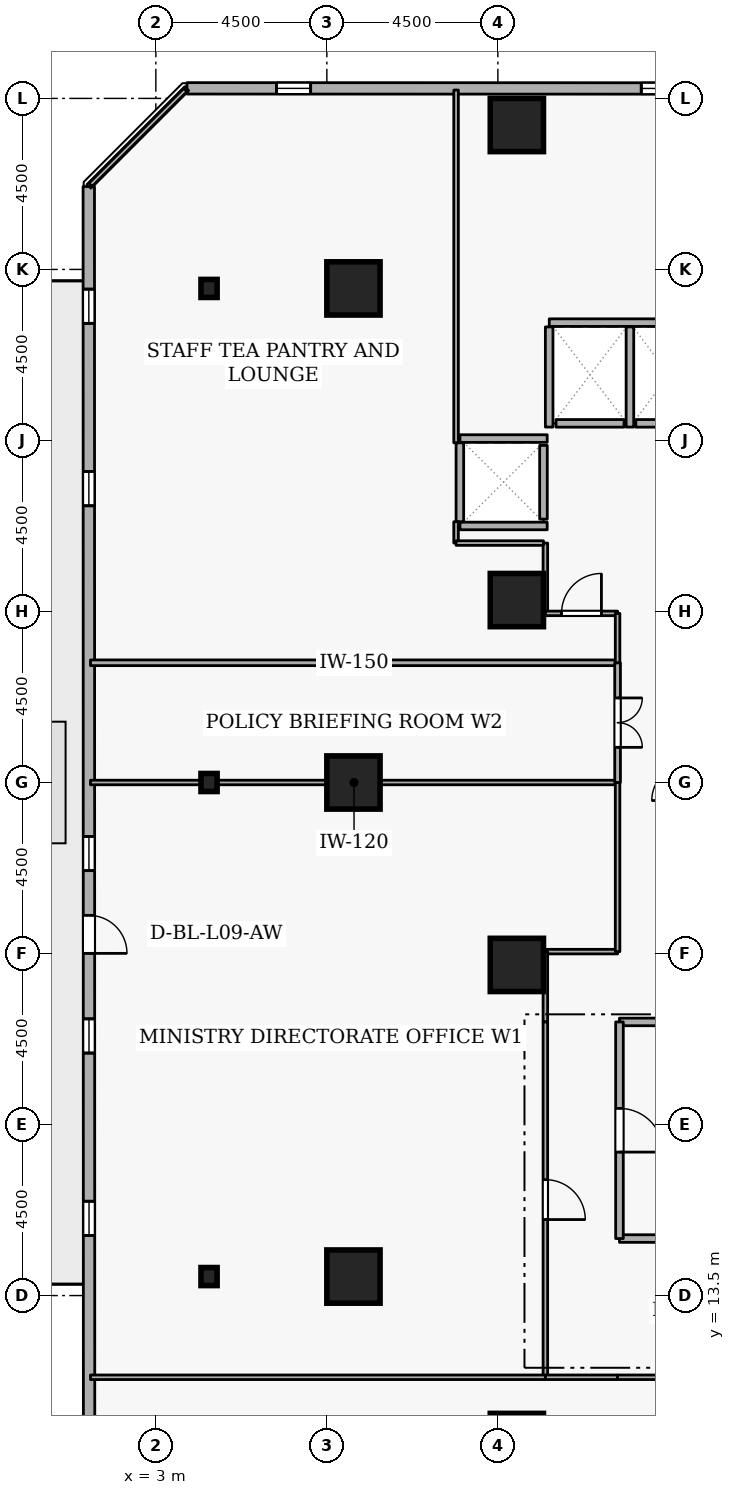
"""IFC4 building model, lengths in metres.
Left out: names, types, materials, properties, quantities, classifications, styles, units other than length and angle.
Written with IfcOpenShell. Run it as: python <this file> out.ifc"""

import sys

from ifc_helpers import new_model, si_unit, direction, frame, frame_2d, origin, origin_2d, place, context, subcontext, project, spatial, rectangle, i_section, extrude, element, fill, save


model = new_model("IFC4")
c1 = context("Model", 3, precision=1e-05, world=origin(), true_north=direction((0.0, 1.0)))
c2 = subcontext(c1, "Body", "Model", "MODEL_VIEW")
j1 = project(units=[si_unit("LENGTHUNIT", "METRE"), si_unit("PLANEANGLEUNIT", "RADIAN")], contexts=[c1])
p1 = place(None, origin())
s1 = spatial("IfcSite", under=j1, at=p1, CompositionType="ELEMENT")
p2 = place(p1, origin())
s2 = spatial("IfcBuilding", under=s1, at=p2, CompositionType="ELEMENT")
p3 = place(p2, frame((0.0, 0.0, 38.7)))
s3 = spatial("IfcBuildingStorey", under=s2, at=p3, CompositionType="ELEMENT", Elevation=38.7)
for number, where, z_axis, x_axis in (
    (1, (12.5, 9.7, 0.0), (0.0, 0.0, 1.0), (1.0, 0.0, 0.0)),
    (2, (12.5, 44.3, 0.0), (0.0, 0.0, 1.0), (1.0, 0.0, 0.0)),
    (3, (8.2, 14.0, 0.0), (0.0, 0.0, 1.0), (1.0, 0.0, 0.0)),
    (4, (8.2, 27.0, 0.0), (0.0, 0.0, 1.0), (1.0, 0.0, 0.0)),
    (5, (8.2, 40.0, 0.0), (0.0, 0.0, 1.0), (1.0, 0.0, 0.0)),
    (6, (12.5, 22.2, 0.0), (0.0, 0.0, 1.0), (1.0, 0.0, 0.0)),
    (7, (12.5, 31.8, 0.0), (0.0, 0.0, 1.0), (1.0, 0.0, 0.0)),
):
    element("IfcColumn", number, at=place(p3, frame(where, z_axis=z_axis, x_axis=x_axis)), inside=s3, PredefinedType="COLUMN", context=c2, shape_type="SweptSolid", body=[
        extrude(rectangle(XDim=1.4, YDim=1.4, at=origin_2d()), origin(), (0.0, 0.0, 1.0), 3.6),
    ])
for number, where, z_axis, x_axis in (
    (8, (4.4, 14.0, 0.0), (0.0, 0.0, 1.0), (1.0, 0.0, 0.0)),
    (9, (4.4, 27.0, 0.0), (0.0, 0.0, 1.0), (1.0, 0.0, 0.0)),
    (10, (4.4, 40.0, 0.0), (0.0, 0.0, 1.0), (1.0, 0.0, 0.0)),
):
    element("IfcColumn", number, at=place(p3, frame(where, z_axis=z_axis, x_axis=x_axis)), inside=s3, PredefinedType="COLUMN", context=c2, shape_type="SweptSolid", body=[
        extrude(i_section(OverallWidth=0.424, OverallDepth=0.475, WebThickness=0.048, FlangeThickness=0.077, FilletRadius=0.015, at=origin_2d()), origin(), (0.0, 0.0, 1.0), 3.6),
    ])
p4 = place(p3, frame((38.573, 45.256, 0.0), z_axis=(0.0, 0.0, 1.0), x_axis=(-0.999999969775, 0.000245864205, 0.0)))
e11 = element("IfcWall", 11, at=p4, inside=s3, PredefinedType="STANDARD", context=c2, shape_type="SweptSolid", body=[
    extrude(rectangle(XDim=34.755, YDim=0.3, at=frame_2d((17.377, 0.0))), origin(), (0.0, 0.0, 1.0), 2.7),
])
p5 = place(p4, frame((7.5, 0.0, 0.72)))
e12 = element("IfcOpeningElement", 12, at=p5, cuts=e11, PredefinedType="OPENING", context=c2, shape_type="SweptSolid", body=[
    extrude(rectangle(XDim=0.9, YDim=1.75, at=frame_2d((0.45, 0.875))), frame((0.0, 0.16, 0.0), z_axis=(0.0, -1.0, 0.0), x_axis=(1.0, 0.0, 0.0)), (0.0, 0.0, 1.0), 0.32),
])
p6 = place(p4, frame((17.1, 0.0, 0.72)))
e13 = element("IfcOpeningElement", 13, at=p6, cuts=e11, PredefinedType="OPENING", context=c2, shape_type="SweptSolid", body=[
    extrude(rectangle(XDim=0.9, YDim=1.75, at=frame_2d((0.45, 0.875))), frame((0.0, 0.16, 0.0), z_axis=(0.0, -1.0, 0.0), x_axis=(1.0, 0.0, 0.0)), (0.0, 0.0, 1.0), 0.32),
])
p7 = place(p4, frame((21.9, 0.0, 0.72)))
e14 = element("IfcOpeningElement", 14, at=p7, cuts=e11, PredefinedType="OPENING", context=c2, shape_type="SweptSolid", body=[
    extrude(rectangle(XDim=0.9, YDim=1.75, at=frame_2d((0.45, 0.875))), frame((0.0, 0.16, 0.0), z_axis=(0.0, -1.0, 0.0), x_axis=(1.0, 0.0, 0.0)), (0.0, 0.0, 1.0), 0.32),
])
p8 = place(p4, frame((31.5, 0.0, 0.72)))
e15 = element("IfcOpeningElement", 15, at=p8, cuts=e11, PredefinedType="OPENING", context=c2, shape_type="SweptSolid", body=[
    extrude(rectangle(XDim=0.9, YDim=1.75, at=frame_2d((0.45, 0.875))), frame((0.0, 0.16, 0.0), z_axis=(0.0, -1.0, 0.0), x_axis=(1.0, 0.0, 0.0)), (0.0, 0.0, 1.0), 0.32),
])
p9 = place(p3, frame((1.235, 42.681, 0.0), z_axis=(0.0, 0.0, 1.0), x_axis=(0.000245864205, -0.999999969775, 0.0)))
e16 = element("IfcWall", 16, at=p9, inside=s3, PredefinedType="STANDARD", context=c2, shape_type="SweptSolid", body=[
    extrude(rectangle(XDim=34.755, YDim=0.3, at=frame_2d((17.377, 0.0))), origin(), (0.0, 0.0, 1.0), 2.7),
])
p10 = place(p9, frame((19.177, 0.0, 0.0)))
e17 = element("IfcOpeningElement", 17, at=p10, cuts=e16, PredefinedType="OPENING", context=c2, shape_type="SweptSolid", body=[
    extrude(rectangle(XDim=1.0, YDim=2.08, at=frame_2d((0.5, 1.04))), frame((0.0, 0.16, 0.0), z_axis=(0.0, -1.0, 0.0), x_axis=(1.0, 0.0, 0.0)), (0.0, 0.0, 1.0), 0.32),
])
p11 = place(p9, frame((2.7, 0.0, 0.72)))
e18 = element("IfcOpeningElement", 18, at=p11, cuts=e16, PredefinedType="OPENING", context=c2, shape_type="SweptSolid", body=[
    extrude(rectangle(XDim=0.9, YDim=1.75, at=frame_2d((0.45, 0.875))), frame((0.0, 0.16, 0.0), z_axis=(0.0, -1.0, 0.0), x_axis=(1.0, 0.0, 0.0)), (0.0, 0.0, 1.0), 0.32),
])
p12 = place(p9, frame((7.5, 0.0, 0.72)))
e19 = element("IfcOpeningElement", 19, at=p12, cuts=e16, PredefinedType="OPENING", context=c2, shape_type="SweptSolid", body=[
    extrude(rectangle(XDim=0.9, YDim=1.75, at=frame_2d((0.45, 0.875))), frame((0.0, 0.16, 0.0), z_axis=(0.0, -1.0, 0.0), x_axis=(1.0, 0.0, 0.0)), (0.0, 0.0, 1.0), 0.32),
])
p13 = place(p9, frame((17.1, 0.0, 0.72)))
e20 = element("IfcOpeningElement", 20, at=p13, cuts=e16, PredefinedType="OPENING", context=c2, shape_type="SweptSolid", body=[
    extrude(rectangle(XDim=0.9, YDim=1.75, at=frame_2d((0.45, 0.875))), frame((0.0, 0.16, 0.0), z_axis=(0.0, -1.0, 0.0), x_axis=(1.0, 0.0, 0.0)), (0.0, 0.0, 1.0), 0.32),
])
p14 = place(p9, frame((21.9, 0.0, 0.72)))
e21 = element("IfcOpeningElement", 21, at=p14, cuts=e16, PredefinedType="OPENING", context=c2, shape_type="SweptSolid", body=[
    extrude(rectangle(XDim=0.9, YDim=1.75, at=frame_2d((0.45, 0.875))), frame((0.0, 0.16, 0.0), z_axis=(0.0, -1.0, 0.0), x_axis=(1.0, 0.0, 0.0)), (0.0, 0.0, 1.0), 0.32),
])
p15 = place(p9, frame((26.7, 0.0, 0.72)))
e22 = element("IfcOpeningElement", 22, at=p15, cuts=e16, PredefinedType="OPENING", context=c2, shape_type="SweptSolid", body=[
    extrude(rectangle(XDim=0.9, YDim=1.75, at=frame_2d((0.45, 0.875))), frame((0.0, 0.16, 0.0), z_axis=(0.0, -1.0, 0.0), x_axis=(1.0, 0.0, 0.0)), (0.0, 0.0, 1.0), 0.32),
])
p16 = place(p3, frame((17.37, 36.45, 0.0), z_axis=(0.0, 0.0, 1.0), x_axis=(-1.0, 0.0, 0.0)))
e23 = element("IfcWall", 23, at=p16, inside=s3, PredefinedType="STANDARD", context=c2, shape_type="SweptSolid", body=[
    extrude(rectangle(XDim=1.74, YDim=0.2, at=frame_2d((0.87, 0.0))), origin(), (0.0, 0.0, 1.0), 3.34),
])
p17 = place(p3, frame((15.32, 36.45, 0.0), z_axis=(0.0, 0.0, 1.0), x_axis=(-1.0, 0.0, 0.0)))
e24 = element("IfcWall", 24, at=p17, inside=s3, PredefinedType="STANDARD", context=c2, shape_type="SweptSolid", body=[
    extrude(rectangle(XDim=1.79, YDim=0.2, at=frame_2d((0.895, 0.0))), origin(), (0.0, 0.0, 1.0), 3.34),
])
p18 = place(p3, frame((13.2, 33.93, 0.0), z_axis=(0.0, 0.0, 1.0), x_axis=(0.0, 1.0, 0.0)))
e25 = element("IfcWall", 25, at=p18, inside=s3, PredefinedType="STANDARD", context=c2, shape_type="SweptSolid", body=[
    extrude(rectangle(XDim=1.94, YDim=0.2, at=frame_2d((0.97, 0.0))), origin(), (0.0, 0.0, 1.0), 3.34),
])
p19 = place(p3, frame((13.352, 39.1, 0.0), z_axis=(0.0, 0.0, 1.0), x_axis=(1.0, 0.0, 0.0)))
e26 = element("IfcWall", 26, at=p19, inside=s3, PredefinedType="STANDARD", context=c2, shape_type="SweptSolid", body=[
    extrude(rectangle(XDim=4.196, YDim=0.2, at=frame_2d((2.098, 0.0))), origin(), (0.0, 0.0, 1.0), 3.34),
])
for number, where, z_axis, x_axis in (
    (27, (15.475, 36.352, 0.0), (0.0, 0.0, 1.0), (0.0, 1.0, 0.0)),
    (28, (13.35, 36.352, 0.0), (0.0, 0.0, 1.0), (0.0, 1.0, 0.0)),
):
    element("IfcWall", number, at=place(p3, frame(where, z_axis=z_axis, x_axis=x_axis)), inside=s3, PredefinedType="STANDARD", context=c2, shape_type="SweptSolid", body=[
        extrude(rectangle(XDim=2.636, YDim=0.2, at=frame_2d((1.318, 0.0))), origin(), (0.0, 0.0, 1.0), 3.34),
    ])
for number, where, z_axis, x_axis in (
    (29, (11.002, 36.05, 0.0), (0.0, 0.0, 1.0), (1.0, 0.0, 0.0)),
    (30, (11.002, 33.75, 0.0), (0.0, 0.0, 1.0), (1.0, 0.0, 0.0)),
):
    element("IfcWall", number, at=place(p3, frame(where, z_axis=z_axis, x_axis=x_axis)), inside=s3, PredefinedType="STANDARD", context=c2, shape_type="SweptSolid", body=[
        extrude(rectangle(XDim=2.296, YDim=0.2, at=frame_2d((1.148, 0.0))), origin(), (0.0, 0.0, 1.0), 3.34),
    ])
p20 = place(p3, frame((11.0, 33.862, 0.0), z_axis=(0.0, 0.0, 1.0), x_axis=(0.0, 1.0, 0.0)))
e31 = element("IfcWall", 31, at=p20, inside=s3, PredefinedType="STANDARD", context=c2, shape_type="SweptSolid", body=[
    extrude(rectangle(XDim=2.076, YDim=0.2, at=frame_2d((1.038, 0.0))), origin(), (0.0, 0.0, 1.0), 3.34),
])
for number, where, z_axis, x_axis in (
    (32, (15.2, 15.0, 0.0), (0.0, 0.0, 1.0), (1.0, 0.0, 0.0)),
    (33, (17.7, 20.7, 0.0), (0.0, 0.0, 1.0), (-1.0, 0.0, 0.0)),
):
    element("IfcWall", number, at=place(p3, frame(where, z_axis=z_axis, x_axis=x_axis)), inside=s3, PredefinedType="STANDARD", context=c2, shape_type="SweptSolid", body=[
        extrude(rectangle(XDim=2.5, YDim=0.2, at=frame_2d((1.25, 0.0))), origin(), (0.0, 0.0, 1.0), 3.34),
    ])
p21 = place(p3, frame((15.2, 20.7, 0.0), z_axis=(0.0, 0.0, 1.0), x_axis=(0.0, -1.0, 0.0)))
e34 = element("IfcWall", 34, at=p21, inside=s3, PredefinedType="STANDARD", context=c2, shape_type="SweptSolid", body=[
    extrude(rectangle(XDim=5.7, YDim=0.2, at=frame_2d((2.85, 0.0))), origin(), (0.0, 0.0, 1.0), 3.34),
])
p22 = place(p21, frame((2.275, 0.0, 0.0)))
e35 = element("IfcOpeningElement", 35, at=p22, cuts=e34, PredefinedType="OPENING", context=c2, shape_type="SweptSolid", body=[
    extrude(rectangle(XDim=1.15, YDim=2.1, at=frame_2d((0.575, 1.05))), frame((0.0, 0.11, 0.0), z_axis=(0.0, -1.0, 0.0), x_axis=(1.0, 0.0, 0.0)), (0.0, 0.0, 1.0), 0.22),
])
p23 = place(p3, frame((15.15, 22.55, 0.0), z_axis=(0.0, 0.0, 1.0), x_axis=(-1.0, 0.0, 0.0)))
e36 = element("IfcWall", 36, at=p23, inside=s3, PredefinedType="PARTITIONING", context=c2, shape_type="SweptSolid", body=[
    extrude(rectangle(XDim=1.9, YDim=0.12, at=frame_2d((0.95, 0.0))), origin(), (0.0, 0.0, 1.0), 3.34),
])
p24 = place(p3, frame((13.25, 22.55, 0.0), z_axis=(0.0, 0.0, 1.0), x_axis=(0.0, -1.0, 0.0)))
e37 = element("IfcWall", 37, at=p24, inside=s3, PredefinedType="PARTITIONING", context=c2, shape_type="SweptSolid", body=[
    extrude(rectangle(XDim=1.85, YDim=0.12, at=frame_2d((0.925, 0.0))), origin(), (0.0, 0.0, 1.0), 3.34),
])
p25 = place(p3, frame((13.25, 20.7, 0.0), z_axis=(0.0, 0.0, 1.0), x_axis=(0.0, -1.0, 0.0)))
e38 = element("IfcWall", 38, at=p25, inside=s3, PredefinedType="PARTITIONING", context=c2, shape_type="SweptSolid", body=[
    extrude(rectangle(XDim=9.35, YDim=0.12, at=frame_2d((4.675, 0.0))), origin(), (0.0, 0.0, 1.0), 3.34),
])
p26 = place(p25, frame((4.15, 0.0, 0.0)))
e39 = element("IfcOpeningElement", 39, at=p26, cuts=e38, PredefinedType="OPENING", context=c2, shape_type="SweptSolid", body=[
    extrude(rectangle(XDim=1.05, YDim=2.1, at=frame_2d((0.525, 1.05))), frame((0.0, 0.07, 0.0), z_axis=(0.0, -1.0, 0.0), x_axis=(1.0, 0.0, 0.0)), (0.0, 0.0, 1.0), 0.14),
])
p27 = place(p3, frame((13.25, 11.35, 0.0), z_axis=(0.0, 0.0, 1.0), x_axis=(-1.0, 0.0, 0.0)))
e40 = element("IfcWall", 40, at=p27, inside=s3, PredefinedType="PARTITIONING", context=c2, shape_type="SweptSolid", body=[
    extrude(rectangle(XDim=11.97, YDim=0.12, at=frame_2d((5.985, 0.0))), origin(), (0.0, 0.0, 1.0), 3.34),
])
p28 = place(p3, frame((1.28, 27.0, 0.0), z_axis=(0.0, 0.0, 1.0), x_axis=(1.0, 0.0, 0.0)))
e41 = element("IfcWall", 41, at=p28, inside=s3, PredefinedType="PARTITIONING", context=c2, shape_type="SweptSolid", body=[
    extrude(rectangle(XDim=13.87, YDim=0.12, at=frame_2d((6.935, 0.0))), origin(), (0.0, 0.0, 1.0), 2.882),
])
p29 = place(p3, frame((15.15, 27.0, 0.0), z_axis=(0.0, 0.0, 1.0), x_axis=(0.0, -1.0, 0.0)))
e42 = element("IfcWall", 42, at=p29, inside=s3, PredefinedType="PARTITIONING", context=c2, shape_type="SweptSolid", body=[
    extrude(rectangle(XDim=4.45, YDim=0.12, at=frame_2d((2.225, 0.0))), origin(), (0.0, 0.0, 1.0), 3.34),
])
p30 = place(p3, frame((1.28, 30.15, 0.0), z_axis=(0.0, 0.0, 1.0), x_axis=(1.0, 0.0, 0.0)))
e43 = element("IfcWall", 43, at=p30, inside=s3, PredefinedType="PARTITIONING", context=c2, shape_type="SweptSolid", body=[
    extrude(rectangle(XDim=13.87, YDim=0.15, at=frame_2d((6.935, 0.0))), origin(), (0.0, 0.0, 1.0), 3.34),
])
p31 = place(p3, frame((15.15, 30.15, 0.0), z_axis=(0.0, 0.0, 1.0), x_axis=(0.0, -1.0, 0.0)))
e44 = element("IfcWall", 44, at=p31, inside=s3, PredefinedType="PARTITIONING", context=c2, shape_type="SweptSolid", body=[
    extrude(rectangle(XDim=3.15, YDim=0.15, at=frame_2d((1.575, 0.0))), origin(), (0.0, 0.0, 1.0), 3.34),
])
p32 = place(p31, frame((0.925, 0.0, 0.0)))
e45 = element("IfcOpeningElement", 45, at=p32, cuts=e44, PredefinedType="OPENING", context=c2, shape_type="SweptSolid", body=[
    extrude(rectangle(XDim=1.3, YDim=2.12, at=frame_2d((0.65, 1.06))), frame((0.0, 0.085, 0.0), z_axis=(0.0, -1.0, 0.0), x_axis=(1.0, 0.0, 0.0)), (0.0, 0.0, 1.0), 0.17),
])
p33 = place(p3, frame((13.25, 33.3, 0.0), z_axis=(0.0, 0.0, 1.0), x_axis=(0.0, -1.0, 0.0)))
e46 = element("IfcWall", 46, at=p33, inside=s3, PredefinedType="PARTITIONING", context=c2, shape_type="SweptSolid", body=[
    extrude(rectangle(XDim=1.85, YDim=0.12, at=frame_2d((0.925, 0.0))), origin(), (0.0, 0.0, 1.0), 3.34),
])
p34 = place(p3, frame((13.25, 31.45, 0.0), z_axis=(0.0, 0.0, 1.0), x_axis=(1.0, 0.0, 0.0)))
e47 = element("IfcWall", 47, at=p34, inside=s3, PredefinedType="PARTITIONING", context=c2, shape_type="SweptSolid", body=[
    extrude(rectangle(XDim=1.9, YDim=0.12, at=frame_2d((0.95, 0.0))), origin(), (0.0, 0.0, 1.0), 3.34),
])
p35 = place(p34, frame((0.425, 0.0, 0.0)))
e48 = element("IfcOpeningElement", 48, at=p35, cuts=e47, PredefinedType="OPENING", context=c2, shape_type="SweptSolid", body=[
    extrude(rectangle(XDim=1.05, YDim=2.1, at=frame_2d((0.525, 1.05))), frame((0.0, 0.07, 0.0), z_axis=(0.0, -1.0, 0.0), x_axis=(1.0, 0.0, 0.0)), (0.0, 0.0, 1.0), 0.14),
])
p36 = place(p3, frame((15.15, 31.45, 0.0), z_axis=(0.0, 0.0, 1.0), x_axis=(0.0, -1.0, 0.0)))
e49 = element("IfcWall", 49, at=p36, inside=s3, PredefinedType="PARTITIONING", context=c2, shape_type="SweptSolid", body=[
    extrude(rectangle(XDim=1.3, YDim=0.12, at=frame_2d((0.65, 0.0))), origin(), (0.0, 0.0, 1.0), 3.34),
])
p37 = place(p3, frame((1.28, 42.725, 0.0), z_axis=(0.0, 0.0, 1.0), x_axis=(0.707106781187, 0.707106781187, 0.0)))
e50 = element("IfcWall", 50, at=p37, inside=s3, PredefinedType="PARTITIONING", context=c2, shape_type="SweptSolid", body=[
    extrude(rectangle(XDim=3.528, YDim=0.12, at=frame_2d((1.764, 0.0))), origin(), (0.0, 0.0, 1.0), 3.34),
])
p38 = place(p3, frame((10.9, 45.22, 0.0), z_axis=(0.0, 0.0, 1.0), x_axis=(0.0, -1.0, 0.0)))
e51 = element("IfcWall", 51, at=p38, inside=s3, PredefinedType="PARTITIONING", context=c2, shape_type="SweptSolid", body=[
    extrude(rectangle(XDim=9.282, YDim=0.12, at=frame_2d((4.641, 0.0))), origin(), (0.0, 0.0, 1.0), 3.34),
])
p39 = place(p3, frame((10.9, 33.862, 0.0), z_axis=(0.0, 0.0, 1.0), x_axis=(0.0, -1.0, 0.0)))
e52 = element("IfcWall", 52, at=p39, inside=s3, PredefinedType="PARTITIONING", context=c2, shape_type="SweptSolid", body=[
    extrude(rectangle(XDim=0.562, YDim=0.12, at=frame_2d((0.281, 0.0))), origin(), (0.0, 0.0, 1.0), 3.34),
])
p40 = place(p3, frame((10.9, 33.3, 0.0), z_axis=(0.0, 0.0, 1.0), x_axis=(1.0, 0.0, 0.0)))
e53 = element("IfcWall", 53, at=p40, inside=s3, PredefinedType="PARTITIONING", context=c2, shape_type="SweptSolid", body=[
    extrude(rectangle(XDim=2.3, YDim=0.12, at=frame_2d((1.15, 0.0))), origin(), (0.0, 0.0, 1.0), 3.34),
])
p41 = place(p3, frame((13.25, 11.35, 0.0), z_axis=(0.0, 0.0, 1.0), x_axis=(1.0, 0.0, 0.0)))
e54 = element("IfcWall", 54, at=p41, inside=s3, PredefinedType="PARTITIONING", context=c2, shape_type="SweptSolid", body=[
    extrude(rectangle(XDim=1.9, YDim=0.12, at=frame_2d((0.95, 0.0))), origin(), (0.0, 0.0, 1.0), 3.34),
])
p42 = place(p3, frame((15.15, 11.35, 0.0), z_axis=(0.0, 0.0, 1.0), x_axis=(1.0, 0.0, 0.0)))
e55 = element("IfcWall", 55, at=p42, inside=s3, PredefinedType="PARTITIONING", context=c2, shape_type="SweptSolid", body=[
    extrude(rectangle(XDim=4.85, YDim=0.12, at=frame_2d((2.425, 0.0))), origin(), (0.0, 0.0, 1.0), 3.34),
])
p43 = place(p42, frame((1.9, 0.0, 0.0)))
e56 = element("IfcOpeningElement", 56, at=p43, cuts=e55, PredefinedType="OPENING", context=c2, shape_type="SweptSolid", body=[
    extrude(rectangle(XDim=1.05, YDim=2.1, at=frame_2d((0.525, 1.05))), frame((0.0, 0.07, 0.0), z_axis=(0.0, -1.0, 0.0), x_axis=(1.0, 0.0, 0.0)), (0.0, 0.0, 1.0), 0.14),
])
p44 = place(p7, origin())
e57 = element("IfcWindow", 57, at=p44, inside=s3, PartitioningType="SINGLE_PANEL", PredefinedType="WINDOW", context=c2, shape_type="SweptSolid", body=[
    extrude(rectangle(XDim=0.9, YDim=1.75, at=frame_2d((0.45, 0.875))), frame((0.0, 0.03, 0.0), z_axis=(0.0, -1.0, 0.0), x_axis=(1.0, 0.0, 0.0)), (0.0, 0.0, 1.0), 0.06),
])
fill(e14, e57)
p45 = place(p8, origin())
e58 = element("IfcWindow", 58, at=p45, inside=s3, PartitioningType="SINGLE_PANEL", PredefinedType="WINDOW", context=c2, shape_type="SweptSolid", body=[
    extrude(rectangle(XDim=0.9, YDim=1.75, at=frame_2d((0.45, 0.875))), frame((0.0, 0.03, 0.0), z_axis=(0.0, -1.0, 0.0), x_axis=(1.0, 0.0, 0.0)), (0.0, 0.0, 1.0), 0.06),
])
fill(e15, e58)
p46 = place(p10, origin())
e59 = element("IfcDoor", 59, at=p46, inside=s3, OperationType="SINGLE_SWING_RIGHT", PredefinedType="DOOR", context=c2, shape_type="SweptSolid", body=[
    extrude(rectangle(XDim=1.0, YDim=2.08, at=frame_2d((0.5, 1.04))), frame((0.0, 0.025, 0.0), z_axis=(0.0, -1.0, 0.0), x_axis=(1.0, 0.0, 0.0)), (0.0, 0.0, 1.0), 0.05),
])
fill(e17, e59)
p47 = place(p11, origin())
e60 = element("IfcWindow", 60, at=p47, inside=s3, PartitioningType="SINGLE_PANEL", PredefinedType="WINDOW", context=c2, shape_type="SweptSolid", body=[
    extrude(rectangle(XDim=0.9, YDim=1.75, at=frame_2d((0.45, 0.875))), frame((0.0, 0.03, 0.0), z_axis=(0.0, -1.0, 0.0), x_axis=(1.0, 0.0, 0.0)), (0.0, 0.0, 1.0), 0.06),
])
fill(e18, e60)
p48 = place(p12, origin())
e61 = element("IfcWindow", 61, at=p48, inside=s3, PartitioningType="SINGLE_PANEL", PredefinedType="WINDOW", context=c2, shape_type="SweptSolid", body=[
    extrude(rectangle(XDim=0.9, YDim=1.75, at=frame_2d((0.45, 0.875))), frame((0.0, 0.03, 0.0), z_axis=(0.0, -1.0, 0.0), x_axis=(1.0, 0.0, 0.0)), (0.0, 0.0, 1.0), 0.06),
])
fill(e19, e61)
p49 = place(p13, origin())
e62 = element("IfcWindow", 62, at=p49, inside=s3, PartitioningType="SINGLE_PANEL", PredefinedType="WINDOW", context=c2, shape_type="SweptSolid", body=[
    extrude(rectangle(XDim=0.9, YDim=1.75, at=frame_2d((0.45, 0.875))), frame((0.0, 0.03, 0.0), z_axis=(0.0, -1.0, 0.0), x_axis=(1.0, 0.0, 0.0)), (0.0, 0.0, 1.0), 0.06),
])
fill(e20, e62)
p50 = place(p14, origin())
e63 = element("IfcWindow", 63, at=p50, inside=s3, PartitioningType="SINGLE_PANEL", PredefinedType="WINDOW", context=c2, shape_type="SweptSolid", body=[
    extrude(rectangle(XDim=0.9, YDim=1.75, at=frame_2d((0.45, 0.875))), frame((0.0, 0.03, 0.0), z_axis=(0.0, -1.0, 0.0), x_axis=(1.0, 0.0, 0.0)), (0.0, 0.0, 1.0), 0.06),
])
fill(e21, e63)
p51 = place(p15, origin())
e64 = element("IfcWindow", 64, at=p51, inside=s3, PartitioningType="SINGLE_PANEL", PredefinedType="WINDOW", context=c2, shape_type="SweptSolid", body=[
    extrude(rectangle(XDim=0.9, YDim=1.75, at=frame_2d((0.45, 0.875))), frame((0.0, 0.03, 0.0), z_axis=(0.0, -1.0, 0.0), x_axis=(1.0, 0.0, 0.0)), (0.0, 0.0, 1.0), 0.06),
])
fill(e22, e64)
p52 = place(p22, origin())
e65 = element("IfcDoor", 65, at=p52, inside=s3, OperationType="SINGLE_SWING_RIGHT", PredefinedType="DOOR", context=c2, shape_type="SweptSolid", body=[
    extrude(rectangle(XDim=1.15, YDim=2.1, at=frame_2d((0.575, 1.05))), frame((0.0, 0.025, 0.0), z_axis=(0.0, -1.0, 0.0), x_axis=(1.0, 0.0, 0.0)), (0.0, 0.0, 1.0), 0.05),
])
fill(e35, e65)
p53 = place(p26, origin())
e66 = element("IfcDoor", 66, at=p53, inside=s3, OperationType="SINGLE_SWING_RIGHT", PredefinedType="DOOR", context=c2, shape_type="SweptSolid", body=[
    extrude(rectangle(XDim=1.05, YDim=2.1, at=frame_2d((0.525, 1.05))), frame((0.0, 0.025, 0.0), z_axis=(0.0, -1.0, 0.0), x_axis=(1.0, 0.0, 0.0)), (0.0, 0.0, 1.0), 0.05),
])
fill(e39, e66)
p54 = place(p32, origin())
e67 = element("IfcDoor", 67, at=p54, inside=s3, OperationType="DOUBLE_DOOR_SINGLE_SWING", PredefinedType="DOOR", context=c2, shape_type="SweptSolid", body=[
    extrude(rectangle(XDim=1.3, YDim=2.12, at=frame_2d((0.65, 1.06))), frame((0.0, 0.025, 0.0), z_axis=(0.0, -1.0, 0.0), x_axis=(1.0, 0.0, 0.0)), (0.0, 0.0, 1.0), 0.05),
])
fill(e45, e67)
p55 = place(p35, origin())
e68 = element("IfcDoor", 68, at=p55, inside=s3, OperationType="SINGLE_SWING_RIGHT", PredefinedType="DOOR", context=c2, shape_type="SweptSolid", body=[
    extrude(rectangle(XDim=1.05, YDim=2.1, at=frame_2d((0.525, 1.05))), frame((0.0, 0.025, 0.0), z_axis=(0.0, -1.0, 0.0), x_axis=(1.0, 0.0, 0.0)), (0.0, 0.0, 1.0), 0.05),
])
fill(e48, e68)
save(model, sys.argv[1])
